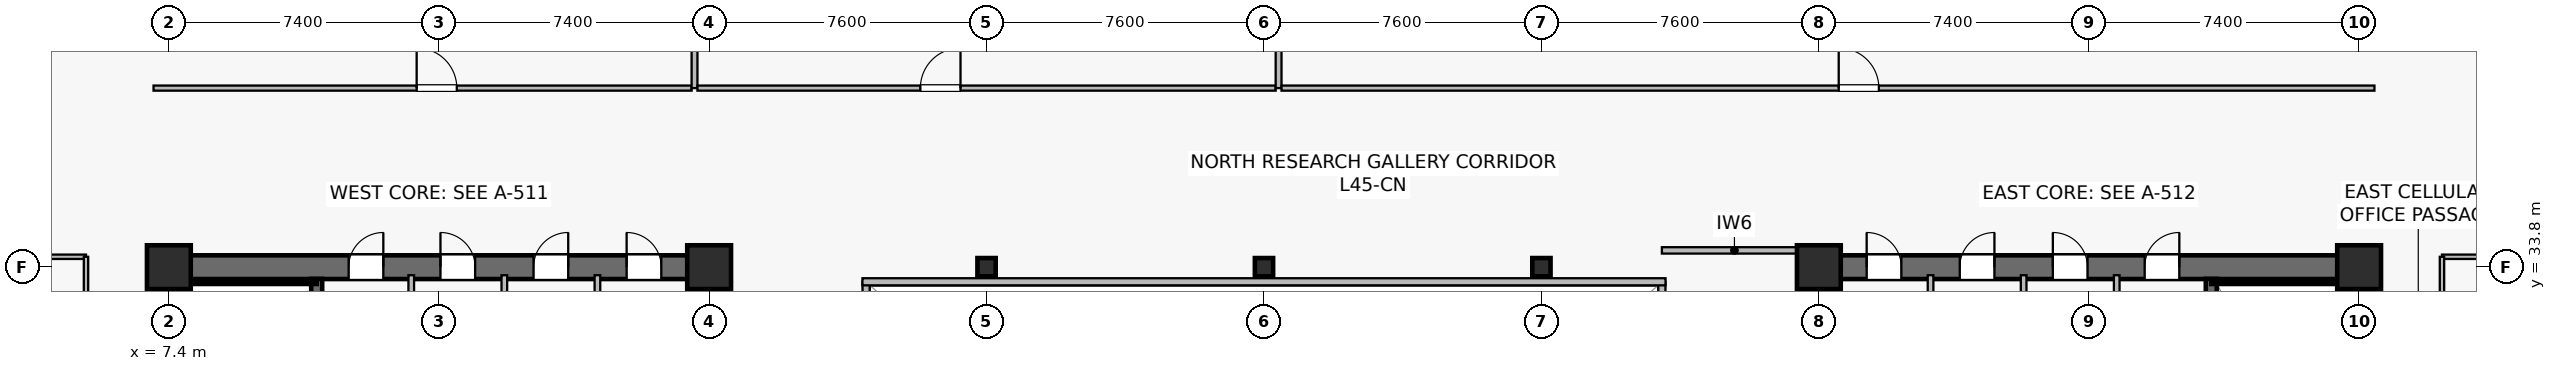
"""IFC4 building model, lengths in metres.
Left out: names, types, materials, properties, quantities, classifications, styles, units other than length and angle.
Written with IfcOpenShell. Run it as: python <this file> out.ifc"""

import sys

from ifc_helpers import new_model, si_unit, direction, frame, frame_2d, origin, origin_2d, place, context, subcontext, project, spatial, rectangle, hollow_rectangle, extrude, source, transform, mapped, element, fill, save


model = new_model("IFC4")
c1 = context("Model", 3, precision=1e-05, world=origin(), true_north=direction((0.0, 1.0)))
c2 = subcontext(c1, "Body", "Model", "MODEL_VIEW")
j1 = project(units=[si_unit("LENGTHUNIT", "METRE"), si_unit("PLANEANGLEUNIT", "RADIAN")], contexts=[c1])
p1 = place(None, origin())
s1 = spatial("IfcSite", under=j1, at=p1, CompositionType="ELEMENT")
p2 = place(p1, origin())
s2 = spatial("IfcBuilding", under=s1, at=p2, CompositionType="ELEMENT")
p3 = place(p2, frame((0.0, 0.0, 187.1)))
s3 = spatial("IfcBuildingStorey", under=s2, at=p3, CompositionType="ELEMENT", Elevation=187.1)
p4 = place(p3, frame((7.075, 33.8, 0.0), z_axis=(0.0, 0.0, 1.0), x_axis=(1.0, 0.0, 0.0)))
e1 = element("IfcWall", 1, at=p4, inside=s3, PredefinedType="SHEAR", context=c2, shape_type="SweptSolid", body=[
    extrude(rectangle(XDim=15.45, YDim=0.65, at=frame_2d((7.725, 0.0))), origin(), (0.0, 0.0, 1.0), 3.79),
])
p5 = place(p4, frame((5.25, 0.0, 0.0)))
e2 = element("IfcOpeningElement", 2, at=p5, cuts=e1, PredefinedType="OPENING", context=c2, shape_type="SweptSolid", body=[
    extrude(rectangle(XDim=0.95, YDim=2.15, at=frame_2d((0.475, 1.075))), frame((0.0, 0.335, 0.0), z_axis=(0.0, -1.0, 0.0), x_axis=(1.0, 0.0, 0.0)), (0.0, 0.0, 1.0), 0.67),
])
p6 = place(p4, frame((7.765, 0.0, 0.0)))
e3 = element("IfcOpeningElement", 3, at=p6, cuts=e1, PredefinedType="OPENING", context=c2, shape_type="SweptSolid", body=[
    extrude(rectangle(XDim=0.95, YDim=2.15, at=frame_2d((0.475, 1.075))), frame((0.0, 0.335, 0.0), z_axis=(0.0, -1.0, 0.0), x_axis=(1.0, 0.0, 0.0)), (0.0, 0.0, 1.0), 0.67),
])
p7 = place(p4, frame((10.315, 0.0, 0.0)))
e4 = element("IfcOpeningElement", 4, at=p7, cuts=e1, PredefinedType="OPENING", context=c2, shape_type="SweptSolid", body=[
    extrude(rectangle(XDim=0.95, YDim=2.15, at=frame_2d((0.475, 1.075))), frame((0.0, 0.335, 0.0), z_axis=(0.0, -1.0, 0.0), x_axis=(1.0, 0.0, 0.0)), (0.0, 0.0, 1.0), 0.67),
])
p8 = place(p4, frame((12.865, 0.0, 0.0)))
e5 = element("IfcOpeningElement", 5, at=p8, cuts=e1, PredefinedType="OPENING", context=c2, shape_type="SweptSolid", body=[
    extrude(rectangle(XDim=0.95, YDim=2.15, at=frame_2d((0.475, 1.075))), frame((0.0, 0.335, 0.0), z_axis=(0.0, -1.0, 0.0), x_axis=(1.0, 0.0, 0.0)), (0.0, 0.0, 1.0), 0.67),
])
p9 = place(p3, frame((7.4, 15.125, 0.0), z_axis=(0.0, 0.0, 1.0), x_axis=(0.0, 1.0, 0.0)))
e6 = element("IfcWall", 6, at=p9, inside=s3, PredefinedType="SHEAR", context=c2, shape_type="SweptSolid", body=[
    extrude(rectangle(XDim=18.35, YDim=0.65, at=frame_2d((9.175, 0.0))), origin(), (0.0, 0.0, 1.0), 3.79),
])
p10 = place(p3, frame((22.2, 15.125, 0.0), z_axis=(0.0, 0.0, 1.0), x_axis=(0.0, 1.0, 0.0)))
e7 = element("IfcWall", 7, at=p10, inside=s3, PredefinedType="SHEAR", context=c2, shape_type="SweptSolid", body=[
    extrude(rectangle(XDim=18.35, YDim=0.65, at=frame_2d((9.175, 0.0))), origin(), (0.0, 0.0, 1.0), 3.79),
])
p11 = place(p10, frame((3.425, 0.0, 0.0)))
e8 = element("IfcOpeningElement", 8, at=p11, cuts=e7, PredefinedType="OPENING", context=c2, shape_type="SweptSolid", body=[
    extrude(rectangle(XDim=1.42, YDim=2.2, at=frame_2d((0.71, 1.1))), frame((0.0, 0.335, 0.0), z_axis=(0.0, -1.0, 0.0), x_axis=(1.0, 0.0, 0.0)), (0.0, 0.0, 1.0), 0.67),
])
p12 = place(p3, frame((11.45, 24.85, 0.0), z_axis=(0.0, 0.0, 1.0), x_axis=(0.0, 1.0, 0.0)))
e9 = element("IfcWall", 9, at=p12, inside=s3, PredefinedType="SHEAR", context=c2, shape_type="SweptSolid", body=[
    extrude(rectangle(XDim=8.63, YDim=0.3, at=frame_2d((4.315, 0.0))), origin(), (0.0, 0.0, 1.0), 3.79),
])
p13 = place(p12, frame((0.42, 0.0, 0.0)))
e10 = element("IfcOpeningElement", 10, at=p13, cuts=e9, PredefinedType="OPENING", context=c2, shape_type="SweptSolid", body=[
    extrude(rectangle(XDim=1.1, YDim=2.15, at=frame_2d((0.55, 1.075))), frame((0.0, 0.16, 0.0), z_axis=(0.0, -1.0, 0.0), x_axis=(1.0, 0.0, 0.0)), (0.0, 0.0, 1.0), 0.32),
])
p14 = place(p3, frame((7.73, 33.4, 0.0), z_axis=(0.0, 0.0, 1.0), x_axis=(1.0, 0.0, 0.0)))
e11 = element("IfcWall", 11, at=p14, inside=s3, PredefinedType="SOLIDWALL", context=c2, shape_type="SweptSolid", body=[
    extrude(rectangle(XDim=3.72, YDim=0.12, at=frame_2d((1.86, 0.0))), origin(), (0.0, 0.0, 1.0), 3.79),
])
p15 = place(p3, frame((7.73, 25.0, 0.0), z_axis=(0.0, 0.0, 1.0), x_axis=(0.0, 1.0, 0.0)))
e12 = element("IfcWall", 12, at=p15, inside=s3, PredefinedType="SOLIDWALL", context=c2, shape_type="SweptSolid", body=[
    extrude(rectangle(XDim=8.32, YDim=0.12, at=frame_2d((4.16, 0.0))), origin(), (0.0, 0.0, 1.0), 3.79),
])
p16 = place(p3, frame((52.275, 33.8, 0.0), z_axis=(0.0, 0.0, 1.0), x_axis=(1.0, 0.0, 0.0)))
e13 = element("IfcWall", 13, at=p16, inside=s3, PredefinedType="SHEAR", context=c2, shape_type="SweptSolid", body=[
    extrude(rectangle(XDim=15.45, YDim=0.65, at=frame_2d((7.725, 0.0))), origin(), (0.0, 0.0, 1.0), 3.79),
])
p17 = place(p16, frame((9.25, 0.0, 0.0)))
e14 = element("IfcOpeningElement", 14, at=p17, cuts=e13, PredefinedType="OPENING", context=c2, shape_type="SweptSolid", body=[
    extrude(rectangle(XDim=0.95, YDim=2.15, at=frame_2d((0.475, 1.075))), frame((0.0, 0.335, 0.0), z_axis=(0.0, -1.0, 0.0), x_axis=(1.0, 0.0, 0.0)), (0.0, 0.0, 1.0), 0.67),
])
p18 = place(p16, frame((6.735, 0.0, 0.0)))
e15 = element("IfcOpeningElement", 15, at=p18, cuts=e13, PredefinedType="OPENING", context=c2, shape_type="SweptSolid", body=[
    extrude(rectangle(XDim=0.95, YDim=2.15, at=frame_2d((0.475, 1.075))), frame((0.0, 0.335, 0.0), z_axis=(0.0, -1.0, 0.0), x_axis=(1.0, 0.0, 0.0)), (0.0, 0.0, 1.0), 0.67),
])
p19 = place(p16, frame((4.185, 0.0, 0.0)))
e16 = element("IfcOpeningElement", 16, at=p19, cuts=e13, PredefinedType="OPENING", context=c2, shape_type="SweptSolid", body=[
    extrude(rectangle(XDim=0.95, YDim=2.15, at=frame_2d((0.475, 1.075))), frame((0.0, 0.335, 0.0), z_axis=(0.0, -1.0, 0.0), x_axis=(1.0, 0.0, 0.0)), (0.0, 0.0, 1.0), 0.67),
])
p20 = place(p16, frame((1.635, 0.0, 0.0)))
e17 = element("IfcOpeningElement", 17, at=p20, cuts=e13, PredefinedType="OPENING", context=c2, shape_type="SweptSolid", body=[
    extrude(rectangle(XDim=0.95, YDim=2.15, at=frame_2d((0.475, 1.075))), frame((0.0, 0.335, 0.0), z_axis=(0.0, -1.0, 0.0), x_axis=(1.0, 0.0, 0.0)), (0.0, 0.0, 1.0), 0.67),
])
p21 = place(p3, frame((52.6, 15.125, 0.0), z_axis=(0.0, 0.0, 1.0), x_axis=(0.0, 1.0, 0.0)))
e18 = element("IfcWall", 18, at=p21, inside=s3, PredefinedType="SHEAR", context=c2, shape_type="SweptSolid", body=[
    extrude(rectangle(XDim=18.35, YDim=0.65, at=frame_2d((9.175, 0.0))), origin(), (0.0, 0.0, 1.0), 3.79),
])
p22 = place(p21, frame((3.425, 0.0, 0.0)))
e19 = element("IfcOpeningElement", 19, at=p22, cuts=e18, PredefinedType="OPENING", context=c2, shape_type="SweptSolid", body=[
    extrude(rectangle(XDim=1.42, YDim=2.2, at=frame_2d((0.71, 1.1))), frame((0.0, 0.335, 0.0), z_axis=(0.0, -1.0, 0.0), x_axis=(1.0, 0.0, 0.0)), (0.0, 0.0, 1.0), 0.67),
])
p23 = place(p3, frame((67.4, 15.125, 0.0), z_axis=(0.0, 0.0, 1.0), x_axis=(0.0, 1.0, 0.0)))
e20 = element("IfcWall", 20, at=p23, inside=s3, PredefinedType="SHEAR", context=c2, shape_type="SweptSolid", body=[
    extrude(rectangle(XDim=18.35, YDim=0.65, at=frame_2d((9.175, 0.0))), origin(), (0.0, 0.0, 1.0), 3.79),
])
p24 = place(p3, frame((63.35, 24.85, 0.0), z_axis=(0.0, 0.0, 1.0), x_axis=(0.0, 1.0, 0.0)))
e21 = element("IfcWall", 21, at=p24, inside=s3, PredefinedType="SHEAR", context=c2, shape_type="SweptSolid", body=[
    extrude(rectangle(XDim=8.63, YDim=0.3, at=frame_2d((4.315, 0.0))), origin(), (0.0, 0.0, 1.0), 3.79),
])
p25 = place(p24, frame((0.42, 0.0, 0.0)))
e22 = element("IfcOpeningElement", 22, at=p25, cuts=e21, PredefinedType="OPENING", context=c2, shape_type="SweptSolid", body=[
    extrude(rectangle(XDim=1.1, YDim=2.15, at=frame_2d((0.55, 1.075))), frame((0.0, 0.16, 0.0), z_axis=(0.0, -1.0, 0.0), x_axis=(1.0, 0.0, 0.0)), (0.0, 0.0, 1.0), 0.32),
])
p26 = place(p3, frame((63.35, 33.4, 0.0), z_axis=(0.0, 0.0, 1.0), x_axis=(1.0, 0.0, 0.0)))
e23 = element("IfcWall", 23, at=p26, inside=s3, PredefinedType="SOLIDWALL", context=c2, shape_type="SweptSolid", body=[
    extrude(rectangle(XDim=3.72, YDim=0.12, at=frame_2d((1.86, 0.0))), origin(), (0.0, 0.0, 1.0), 3.79),
])
p27 = place(p3, frame((67.07, 25.0, 0.0), z_axis=(0.0, 0.0, 1.0), x_axis=(0.0, 1.0, 0.0)))
e24 = element("IfcWall", 24, at=p27, inside=s3, PredefinedType="SOLIDWALL", context=c2, shape_type="SweptSolid", body=[
    extrude(rectangle(XDim=8.32, YDim=0.12, at=frame_2d((4.16, 0.0))), origin(), (0.0, 0.0, 1.0), 3.79),
])
m1 = source(origin(), c2, "Body", "SweptSolid", [
    extrude(rectangle(XDim=1.2, YDim=1.2, at=origin_2d()), origin(), (0.0, 0.0, 1.0), 4.1),
])
for number, where, z_axis, x_axis in (
    (25, (7.4, 33.8, 0.0), (0.0, 0.0, 1.0), (1.0, 0.0, 0.0)),
    (26, (22.2, 33.8, 0.0), (0.0, 0.0, 1.0), (1.0, 0.0, 0.0)),
    (27, (52.6, 33.8, 0.0), (0.0, 0.0, 1.0), (1.0, 0.0, 0.0)),
    (28, (67.4, 33.8, 0.0), (0.0, 0.0, 1.0), (1.0, 0.0, 0.0)),
):
    element("IfcColumn", number, at=place(p3, frame(where, z_axis=z_axis, x_axis=x_axis)), inside=s3, PredefinedType="COLUMN", context=c2, shape_type="MappedRepresentation", body=[
        mapped(m1, transform((0.0, 0.0, 0.0), scale=1.0)),
    ])
m2 = source(origin(), c2, "Body", "SweptSolid", [
    extrude(hollow_rectangle(XDim=0.5, YDim=0.5, WallThickness=0.022, at=origin_2d()), origin(), (0.0, 0.0, 1.0), 4.1),
])
for number, where, z_axis, x_axis in (
    (29, (29.8, 33.8, 0.0), (0.0, 0.0, 1.0), (1.0, 0.0, 0.0)),
    (30, (37.4, 33.8, 0.0), (0.0, 0.0, 1.0), (1.0, 0.0, 0.0)),
    (31, (45.0, 33.8, 0.0), (0.0, 0.0, 1.0), (1.0, 0.0, 0.0)),
):
    element("IfcColumn", number, at=place(p3, frame(where, z_axis=z_axis, x_axis=x_axis)), inside=s3, PredefinedType="COLUMN", context=c2, shape_type="MappedRepresentation", body=[
        mapped(m2, transform((0.0, 0.0, 0.0), scale=1.0)),
    ])
for number, where, z_axis, x_axis in (
    (32, (14.04, 29.65, 0.0), (0.0, 0.0, 1.0), (0.0, 1.0, 0.0)),
    (33, (16.59, 29.65, 0.0), (0.0, 0.0, 1.0), (0.0, 1.0, 0.0)),
    (34, (19.14, 29.65, 0.0), (0.0, 0.0, 1.0), (0.0, 1.0, 0.0)),
    (35, (60.76, 29.65, 0.0), (0.0, 0.0, 1.0), (0.0, 1.0, 0.0)),
    (36, (58.21, 29.65, 0.0), (0.0, 0.0, 1.0), (0.0, 1.0, 0.0)),
    (37, (55.66, 29.65, 0.0), (0.0, 0.0, 1.0), (0.0, 1.0, 0.0)),
):
    element("IfcWall", number, at=place(p3, frame(where, z_axis=z_axis, x_axis=x_axis)), inside=s3, PredefinedType="PLUMBINGWALL", context=c2, shape_type="SweptSolid", body=[
        extrude(rectangle(XDim=3.93, YDim=0.155, at=frame_2d((1.965, 0.0))), origin(), (0.0, 0.0, 1.0), 3.79),
    ])
p28 = place(p3, frame((48.3, 34.26, 0.0), z_axis=(0.0, 0.0, 1.0), x_axis=(1.0, 0.0, 0.0)))
e38 = element("IfcWall", 38, at=p28, inside=s3, PredefinedType="PARTITIONING", context=c2, shape_type="SweptSolid", body=[
    extrude(rectangle(XDim=3.975, YDim=0.175, at=frame_2d((1.987, 0.0))), origin(), (0.0, 0.0, 1.0), 3.475),
])
p29 = place(p3, frame((26.5, 15.2, 0.0), z_axis=(0.0, 0.0, 1.0), x_axis=(0.0, 1.0, 0.0)))
e39 = element("IfcWall", 39, at=p29, inside=s3, PredefinedType="SOLIDWALL", context=c2, shape_type="SweptSolid", body=[
    extrude(rectangle(XDim=18.2, YDim=0.195, at=frame_2d((9.1, 0.0))), origin(), (0.0, 0.0, 1.0), 3.79),
])
p30 = place(p29, frame((1.8, 0.0, 0.9)))
e40 = element("IfcOpeningElement", 40, at=p30, cuts=e39, PredefinedType="OPENING", context=c2, shape_type="SweptSolid", body=[
    extrude(rectangle(XDim=1.2, YDim=1.35, at=frame_2d((0.6, 0.675))), frame((0.0, 0.107, 0.0), z_axis=(0.0, -1.0, 0.0), x_axis=(1.0, 0.0, 0.0)), (0.0, 0.0, 1.0), 0.215),
])
p31 = place(p29, frame((13.2, 0.0, 0.9)))
e41 = element("IfcOpeningElement", 41, at=p31, cuts=e39, PredefinedType="OPENING", context=c2, shape_type="SweptSolid", body=[
    extrude(rectangle(XDim=1.2, YDim=1.35, at=frame_2d((0.6, 0.675))), frame((0.0, 0.107, 0.0), z_axis=(0.0, -1.0, 0.0), x_axis=(1.0, 0.0, 0.0)), (0.0, 0.0, 1.0), 0.215),
])
p32 = place(p3, frame((48.3, 15.2, 0.0), z_axis=(0.0, 0.0, 1.0), x_axis=(0.0, 1.0, 0.0)))
e42 = element("IfcWall", 42, at=p32, inside=s3, PredefinedType="SOLIDWALL", context=c2, shape_type="SweptSolid", body=[
    extrude(rectangle(XDim=18.2, YDim=0.195, at=frame_2d((9.1, 0.0))), origin(), (0.0, 0.0, 1.0), 3.79),
])
p33 = place(p32, frame((1.8, 0.0, 0.9)))
e43 = element("IfcOpeningElement", 43, at=p33, cuts=e42, PredefinedType="OPENING", context=c2, shape_type="SweptSolid", body=[
    extrude(rectangle(XDim=1.2, YDim=1.35, at=frame_2d((0.6, 0.675))), frame((0.0, 0.107, 0.0), z_axis=(0.0, -1.0, 0.0), x_axis=(1.0, 0.0, 0.0)), (0.0, 0.0, 1.0), 0.215),
])
p34 = place(p32, frame((13.2, 0.0, 0.9)))
e44 = element("IfcOpeningElement", 44, at=p34, cuts=e42, PredefinedType="OPENING", context=c2, shape_type="SweptSolid", body=[
    extrude(rectangle(XDim=1.2, YDim=1.35, at=frame_2d((0.6, 0.675))), frame((0.0, 0.107, 0.0), z_axis=(0.0, -1.0, 0.0), x_axis=(1.0, 0.0, 0.0)), (0.0, 0.0, 1.0), 0.215),
])
p35 = place(p3, frame((26.4, 33.4, 0.0), z_axis=(0.0, 0.0, 1.0), x_axis=(1.0, 0.0, 0.0)))
e45 = element("IfcWall", 45, at=p35, inside=s3, PredefinedType="SOLIDWALL", context=c2, shape_type="SweptSolid", body=[
    extrude(rectangle(XDim=22.0, YDim=0.195, at=frame_2d((11.0, 0.0))), origin(), (0.0, 0.0, 1.0), 3.79),
])
p36 = place(p3, frame((6.98, 38.705, 0.0), z_axis=(0.0, 0.0, 1.0), x_axis=(1.0, 0.0, 0.0)))
e46 = element("IfcWall", 46, at=p36, inside=s3, PredefinedType="PARTITIONING", context=c2, shape_type="SweptSolid", body=[
    extrude(rectangle(XDim=14.74, YDim=0.14, at=frame_2d((7.37, 0.0))), origin(), (0.0, 0.0, 1.0), 3.187),
])
p37 = place(p36, frame((7.208, 0.0, 0.0)))
e47 = element("IfcOpeningElement", 47, at=p37, cuts=e46, PredefinedType="OPENING", context=c2, shape_type="SweptSolid", body=[
    extrude(rectangle(XDim=1.1, YDim=2.18, at=frame_2d((0.55, 1.09))), frame((0.0, 0.08, 0.0), z_axis=(0.0, -1.0, 0.0), x_axis=(1.0, 0.0, 0.0)), (0.0, 0.0, 1.0), 0.16),
])
p38 = place(p3, frame((21.8, 38.705, 0.0), z_axis=(0.0, 0.0, 1.0), x_axis=(0.0, 1.0, 0.0)))
e48 = element("IfcWall", 48, at=p38, inside=s3, PredefinedType="PARTITIONING", context=c2, shape_type="SweptSolid", body=[
    extrude(rectangle(XDim=8.485, YDim=0.16, at=frame_2d((4.242, 0.0))), origin(), (0.0, 0.0, 1.0), 3.075),
])
p39 = place(p3, frame((21.88, 38.705, 0.0), z_axis=(0.0, 0.0, 1.0), x_axis=(1.0, 0.0, 0.0)))
e49 = element("IfcWall", 49, at=p39, inside=s3, PredefinedType="PARTITIONING", context=c2, shape_type="SweptSolid", body=[
    extrude(rectangle(XDim=15.84, YDim=0.14, at=frame_2d((7.92, 0.0))), origin(), (0.0, 0.0, 1.0), 3.187),
])
p40 = place(p39, frame((6.106, 0.0, 0.0)))
e50 = element("IfcOpeningElement", 50, at=p40, cuts=e49, PredefinedType="OPENING", context=c2, shape_type="SweptSolid", body=[
    extrude(rectangle(XDim=1.1, YDim=2.18, at=frame_2d((0.55, 1.09))), frame((0.0, 0.08, 0.0), z_axis=(0.0, -1.0, 0.0), x_axis=(1.0, 0.0, 0.0)), (0.0, 0.0, 1.0), 0.16),
])
p41 = place(p3, frame((37.8, 38.705, 0.0), z_axis=(0.0, 0.0, 1.0), x_axis=(0.0, 1.0, 0.0)))
e51 = element("IfcWall", 51, at=p41, inside=s3, PredefinedType="PARTITIONING", context=c2, shape_type="SweptSolid", body=[
    extrude(rectangle(XDim=7.285, YDim=0.16, at=frame_2d((3.643, 0.0))), origin(), (0.0, 0.0, 1.0), 3.075),
])
p42 = place(p3, frame((37.88, 38.705, 0.0), z_axis=(0.0, 0.0, 1.0), x_axis=(1.0, 0.0, 0.0)))
e52 = element("IfcWall", 52, at=p42, inside=s3, PredefinedType="PARTITIONING", context=c2, shape_type="SweptSolid", body=[
    extrude(rectangle(XDim=29.94, YDim=0.14, at=frame_2d((14.97, 0.0))), origin(), (0.0, 0.0, 1.0), 3.187),
])
p43 = place(p42, frame((15.264, 0.0, 0.0)))
e53 = element("IfcOpeningElement", 53, at=p43, cuts=e52, PredefinedType="OPENING", context=c2, shape_type="SweptSolid", body=[
    extrude(rectangle(XDim=1.1, YDim=2.18, at=frame_2d((0.55, 1.09))), frame((0.0, 0.08, 0.0), z_axis=(0.0, -1.0, 0.0), x_axis=(1.0, 0.0, 0.0)), (0.0, 0.0, 1.0), 0.16),
])
p44 = place(p3, frame((2.11, 34.085, 0.0), z_axis=(0.0, 0.0, 1.0), x_axis=(1.0, 0.0, 0.0)))
e54 = element("IfcWall", 54, at=p44, inside=s3, PredefinedType="PARTITIONING", context=c2, shape_type="SweptSolid", body=[
    extrude(rectangle(XDim=3.02, YDim=0.12, at=frame_2d((1.51, 0.0))), origin(), (0.0, 0.0, 1.0), 3.79),
])
p45 = place(p3, frame((5.13, 14.515, 0.0), z_axis=(0.0, 0.0, 1.0), x_axis=(0.0, 1.0, 0.0)))
e55 = element("IfcWall", 55, at=p45, inside=s3, PredefinedType="PARTITIONING", context=c2, shape_type="SweptSolid", body=[
    extrude(rectangle(XDim=19.57, YDim=0.12, at=frame_2d((9.785, 0.0))), origin(), (0.0, 0.0, 1.0), 3.79),
])
p46 = place(p45, frame((9.335, 0.0, 0.0)))
e56 = element("IfcOpeningElement", 56, at=p46, cuts=e55, PredefinedType="OPENING", context=c2, shape_type="SweptSolid", body=[
    extrude(rectangle(XDim=0.9, YDim=2.1, at=frame_2d((0.45, 1.05))), frame((0.0, 0.07, 0.0), z_axis=(0.0, -1.0, 0.0), x_axis=(1.0, 0.0, 0.0)), (0.0, 0.0, 1.0), 0.14),
])
p47 = place(p3, frame((69.67, 34.085, 0.0), z_axis=(0.0, 0.0, 1.0), x_axis=(1.0, 0.0, 0.0)))
e57 = element("IfcWall", 57, at=p47, inside=s3, PredefinedType="PARTITIONING", context=c2, shape_type="SweptSolid", body=[
    extrude(rectangle(XDim=3.02, YDim=0.12, at=frame_2d((1.51, 0.0))), origin(), (0.0, 0.0, 1.0), 3.79),
])
p48 = place(p3, frame((69.67, 23.66, 0.0), z_axis=(0.0, 0.0, 1.0), x_axis=(0.0, 1.0, 0.0)))
e58 = element("IfcWall", 58, at=p48, inside=s3, PredefinedType="PARTITIONING", context=c2, shape_type="SweptSolid", body=[
    extrude(rectangle(XDim=10.425, YDim=0.12, at=frame_2d((5.212, 0.0))), origin(), (0.0, 0.0, 1.0), 3.79),
])
p49 = place(p48, frame((4.762, 0.0, 0.0)))
e59 = element("IfcOpeningElement", 59, at=p49, cuts=e58, PredefinedType="OPENING", context=c2, shape_type="SweptSolid", body=[
    extrude(rectangle(XDim=0.9, YDim=2.1, at=frame_2d((0.45, 1.05))), frame((0.0, 0.07, 0.0), z_axis=(0.0, -1.0, 0.0), x_axis=(1.0, 0.0, 0.0)), (0.0, 0.0, 1.0), 0.14),
])
m3 = source(origin(), c2, "Body", "SweptSolid", [
    extrude(rectangle(XDim=0.95, YDim=2.15, at=frame_2d((0.475, 1.075))), frame((0.0, 0.025, 0.0), z_axis=(0.0, -1.0, 0.0), x_axis=(1.0, 0.0, 0.0)), (0.0, 0.0, 1.0), 0.05),
])
p50 = place(p5, origin())
e60 = element("IfcDoor", 60, at=p50, inside=s3, OperationType="SINGLE_SWING_RIGHT", PredefinedType="DOOR", context=c2, shape_type="MappedRepresentation", body=[
    mapped(m3, transform((0.0, 0.0, 0.0), scale=1.0)),
])
fill(e2, e60)
p51 = place(p6, origin())
e61 = element("IfcDoor", 61, at=p51, inside=s3, OperationType="SINGLE_SWING_LEFT", PredefinedType="DOOR", context=c2, shape_type="MappedRepresentation", body=[
    mapped(m3, transform((0.0, 0.0, 0.0), scale=1.0)),
])
fill(e3, e61)
p52 = place(p7, origin())
e62 = element("IfcDoor", 62, at=p52, inside=s3, OperationType="SINGLE_SWING_RIGHT", PredefinedType="DOOR", context=c2, shape_type="MappedRepresentation", body=[
    mapped(m3, transform((0.0, 0.0, 0.0), scale=1.0)),
])
fill(e4, e62)
p53 = place(p8, origin())
e63 = element("IfcDoor", 63, at=p53, inside=s3, OperationType="SINGLE_SWING_LEFT", PredefinedType="DOOR", context=c2, shape_type="MappedRepresentation", body=[
    mapped(m3, transform((0.0, 0.0, 0.0), scale=1.0)),
])
fill(e5, e63)
p54 = place(p17, origin())
e64 = element("IfcDoor", 64, at=p54, inside=s3, OperationType="SINGLE_SWING_RIGHT", PredefinedType="DOOR", context=c2, shape_type="MappedRepresentation", body=[
    mapped(m3, transform((0.0, 0.0, 0.0), scale=1.0)),
])
fill(e14, e64)
p55 = place(p18, origin())
e65 = element("IfcDoor", 65, at=p55, inside=s3, OperationType="SINGLE_SWING_LEFT", PredefinedType="DOOR", context=c2, shape_type="MappedRepresentation", body=[
    mapped(m3, transform((0.0, 0.0, 0.0), scale=1.0)),
])
fill(e15, e65)
p56 = place(p19, origin())
e66 = element("IfcDoor", 66, at=p56, inside=s3, OperationType="SINGLE_SWING_RIGHT", PredefinedType="DOOR", context=c2, shape_type="MappedRepresentation", body=[
    mapped(m3, transform((0.0, 0.0, 0.0), scale=1.0)),
])
fill(e16, e66)
p57 = place(p20, origin())
e67 = element("IfcDoor", 67, at=p57, inside=s3, OperationType="SINGLE_SWING_LEFT", PredefinedType="DOOR", context=c2, shape_type="MappedRepresentation", body=[
    mapped(m3, transform((0.0, 0.0, 0.0), scale=1.0)),
])
fill(e17, e67)
m4 = source(origin(), c2, "Body", "SweptSolid", [
    extrude(rectangle(XDim=1.1, YDim=2.18, at=frame_2d((0.55, 1.09))), frame((0.0, 0.025, 0.0), z_axis=(0.0, -1.0, 0.0), x_axis=(1.0, 0.0, 0.0)), (0.0, 0.0, 1.0), 0.05),
])
p58 = place(p37, origin())
e68 = element("IfcDoor", 68, at=p58, inside=s3, OperationType="SINGLE_SWING_LEFT", PredefinedType="DOOR", context=c2, shape_type="MappedRepresentation", body=[
    mapped(m4, transform((0.0, 0.0, 0.0), scale=1.0)),
])
fill(e47, e68)
p59 = place(p40, origin())
e69 = element("IfcDoor", 69, at=p59, inside=s3, OperationType="SINGLE_SWING_RIGHT", PredefinedType="DOOR", context=c2, shape_type="MappedRepresentation", body=[
    mapped(m4, transform((0.0, 0.0, 0.0), scale=1.0)),
])
fill(e50, e69)
p60 = place(p43, origin())
e70 = element("IfcDoor", 70, at=p60, inside=s3, OperationType="SINGLE_SWING_LEFT", PredefinedType="DOOR", context=c2, shape_type="MappedRepresentation", body=[
    mapped(m4, transform((0.0, 0.0, 0.0), scale=1.0)),
])
fill(e53, e70)
save(model, sys.argv[1])
